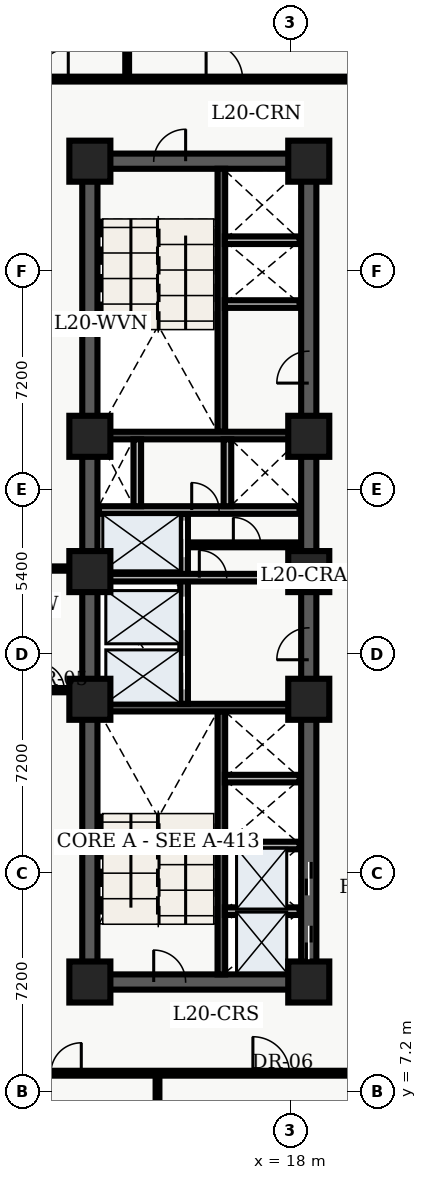
"""IFC4 building model, lengths in metres.
Left out: names, types, materials, properties, quantities, classifications, styles, units other than length and angle.
Written with IfcOpenShell. Run it as: python <this file> out.ifc"""

import sys

from ifc_helpers import new_model, entity, si_unit, converted_unit, direction, frame, origin_with_axes, origin_2d_with_axis, place, context, subcontext, project, spatial, polyline, rectangle, outline, extrude, element, fill, save


model = new_model("IFC4")
c1 = context("Model", 3, precision=1e-05, world=origin_with_axes(), true_north=direction((0.0, 1.0)))
c2 = subcontext(c1, "Body", "Model", "MODEL_VIEW")
j1 = project(units=[si_unit("LENGTHUNIT", "METRE"), converted_unit("PLANEANGLEUNIT", "DEGREE", entity("IfcPlaneAngleMeasure", 0.017), si_unit("PLANEANGLEUNIT", "RADIAN"), dimensions=[0, 0, 0, 0, 0, 0, 0])], contexts=[c1])
p1 = place(None, origin_with_axes())
s1 = spatial("IfcSite", under=j1, at=p1, CompositionType="ELEMENT")
p2 = place(p1, origin_with_axes())
s2 = spatial("IfcBuilding", under=s1, at=p2, CompositionType="ELEMENT")
p3 = place(p2, frame((0.0, 0.0, 84.6), z_axis=(0.0, 0.0, 1.0), x_axis=(1.0, 0.0, 0.0)))
s3 = spatial("IfcBuildingStorey", under=s2, at=p3, CompositionType="ELEMENT", Elevation=84.6)
p4 = place(p3, frame((11.4, 10.8, 0.0), z_axis=(0.0, 0.0, 1.0), x_axis=(0.0, 1.0, 0.0)))
e1 = element("IfcWall", 1, at=p4, inside=s3, PredefinedType="SHEAR", context=c2, shape_type="SweptSolid", body=[
    extrude(outline(polyline([(0.0, -0.25), (27.0, -0.25), (27.0, 0.25), (0.0, 0.25), (0.0, -0.25)])), origin_with_axes(), (0.0, 0.0, 1.0), 4.26),
])
p5 = place(p3, frame((11.4, 10.8, 0.0), z_axis=(0.0, 0.0, 1.0), x_axis=(1.0, 0.0, 0.0)))
e2 = element("IfcWall", 2, at=p5, inside=s3, PredefinedType="SHEAR", context=c2, shape_type="SweptSolid", body=[
    extrude(outline(polyline([(0.0, -0.25), (7.2, -0.25), (7.2, 0.25), (0.0, 0.25), (0.0, -0.25)])), origin_with_axes(), (0.0, 0.0, 1.0), 4.26),
])
p6 = place(p5, frame((2.625, 0.0, 0.0), z_axis=(0.0, 0.0, 1.0), x_axis=(1.0, 0.0, 0.0)))
e3 = element("IfcOpeningElement", 3, at=p6, cuts=e2, PredefinedType="OPENING", context=c2, shape_type="SweptSolid", body=[
    extrude(rectangle(XDim=1.05, YDim=0.52, at=origin_2d_with_axis()), origin_with_axes(), (0.0, 0.0, 1.0), 2.15),
])
p7 = place(p3, frame((11.4, 37.8, 0.0), z_axis=(0.0, 0.0, 1.0), x_axis=(1.0, 0.0, 0.0)))
e4 = element("IfcWall", 4, at=p7, inside=s3, PredefinedType="SHEAR", context=c2, shape_type="SweptSolid", body=[
    extrude(outline(polyline([(0.0, -0.25), (7.2, -0.25), (7.2, 0.25), (0.0, 0.25), (0.0, -0.25)])), origin_with_axes(), (0.0, 0.0, 1.0), 4.26),
])
p8 = place(p7, frame((2.625, 0.0, 0.0), z_axis=(0.0, 0.0, 1.0), x_axis=(1.0, 0.0, 0.0)))
e5 = element("IfcOpeningElement", 5, at=p8, cuts=e4, PredefinedType="OPENING", context=c2, shape_type="SweptSolid", body=[
    extrude(rectangle(XDim=1.05, YDim=0.52, at=origin_2d_with_axis()), origin_with_axes(), (0.0, 0.0, 1.0), 2.15),
])
p9 = place(p3, frame((18.6, 10.8, 0.0), z_axis=(0.0, 0.0, 1.0), x_axis=(0.0, 1.0, 0.0)))
e6 = element("IfcWall", 6, at=p9, inside=s3, PredefinedType="SHEAR", context=c2, shape_type="SweptSolid", body=[
    extrude(outline(polyline([(0.0, -0.25), (13.5, -0.25), (13.5, 0.25), (0.0, 0.25), (0.0, -0.25)])), origin_with_axes(), (0.0, 0.0, 1.0), 4.26),
])
p10 = place(p9, frame((1.3, 0.0, 0.0), z_axis=(0.0, 0.0, 1.0), x_axis=(1.0, 0.0, 0.0)))
e7 = element("IfcOpeningElement", 7, at=p10, cuts=e6, PredefinedType="OPENING", context=c2, shape_type="SweptSolid", body=[
    extrude(rectangle(XDim=1.1, YDim=0.52, at=origin_2d_with_axis()), origin_with_axes(), (0.0, 0.0, 1.0), 2.15),
])
p11 = place(p9, frame((3.4, 0.0, 0.0), z_axis=(0.0, 0.0, 1.0), x_axis=(1.0, 0.0, 0.0)))
e8 = element("IfcOpeningElement", 8, at=p11, cuts=e6, PredefinedType="OPENING", context=c2, shape_type="SweptSolid", body=[
    extrude(rectangle(XDim=1.1, YDim=0.52, at=origin_2d_with_axis()), origin_with_axes(), (0.0, 0.0, 1.0), 2.15),
])
p12 = place(p9, frame((11.125, 0.0, 0.0), z_axis=(0.0, 0.0, 1.0), x_axis=(1.0, 0.0, 0.0)))
e9 = element("IfcOpeningElement", 9, at=p12, cuts=e6, PredefinedType="OPENING", context=c2, shape_type="SweptSolid", body=[
    extrude(rectangle(XDim=1.05, YDim=0.52, at=origin_2d_with_axis()), origin_with_axes(), (0.0, 0.0, 1.0), 2.15),
])
p13 = place(p3, frame((18.6, 24.3, 0.0), z_axis=(0.0, 0.0, 1.0), x_axis=(0.0, 1.0, 0.0)))
e10 = element("IfcWall", 10, at=p13, inside=s3, PredefinedType="SHEAR", context=c2, shape_type="SweptSolid", body=[
    extrude(outline(polyline([(0.0, -0.25), (13.5, -0.25), (13.5, 0.25), (0.0, 0.25), (0.0, -0.25)])), origin_with_axes(), (0.0, 0.0, 1.0), 4.26),
])
p14 = place(p13, frame((6.725, 0.0, 0.0), z_axis=(0.0, 0.0, 1.0), x_axis=(1.0, 0.0, 0.0)))
e11 = element("IfcOpeningElement", 11, at=p14, cuts=e10, PredefinedType="OPENING", context=c2, shape_type="SweptSolid", body=[
    extrude(rectangle(XDim=1.05, YDim=0.52, at=origin_2d_with_axis()), origin_with_axes(), (0.0, 0.0, 1.0), 2.15),
])
p15 = place(p3, frame((15.725, 11.05, 0.0), z_axis=(0.0, 0.0, 1.0), x_axis=(0.0, 1.0, 0.0)))
e12 = element("IfcWall", 12, at=p15, inside=s3, PredefinedType="SHEAR", context=c2, shape_type="SweptSolid", body=[
    extrude(outline(polyline([(0.0, -0.125), (8.65, -0.125), (8.65, 0.125), (0.0, 0.125), (0.0, -0.125)])), origin_with_axes(), (0.0, 0.0, 1.0), 4.26),
])
p16 = place(p3, frame((11.65, 19.825, 0.0), z_axis=(0.0, 0.0, 1.0), x_axis=(1.0, 0.0, 0.0)))
e13 = element("IfcWall", 13, at=p16, inside=s3, PredefinedType="SHEAR", context=c2, shape_type="SweptSolid", body=[
    extrude(outline(polyline([(0.0, -0.125), (6.7, -0.125), (6.7, 0.125), (0.0, 0.125), (0.0, -0.125)])), origin_with_axes(), (0.0, 0.0, 1.0), 4.26),
])
p17 = place(p3, frame((15.725, 28.9, 0.0), z_axis=(0.0, 0.0, 1.0), x_axis=(0.0, 1.0, 0.0)))
e14 = element("IfcWall", 14, at=p17, inside=s3, PredefinedType="SHEAR", context=c2, shape_type="SweptSolid", body=[
    extrude(outline(polyline([(0.0, -0.125), (8.65, -0.125), (8.65, 0.125), (0.0, 0.125), (0.0, -0.125)])), origin_with_axes(), (0.0, 0.0, 1.0), 4.26),
])
p18 = place(p3, frame((11.65, 28.775, 0.0), z_axis=(0.0, 0.0, 1.0), x_axis=(1.0, 0.0, 0.0)))
e15 = element("IfcWall", 15, at=p18, inside=s3, PredefinedType="SHEAR", context=c2, shape_type="SweptSolid", body=[
    extrude(outline(polyline([(0.0, -0.125), (6.7, -0.125), (6.7, 0.125), (0.0, 0.125), (0.0, -0.125)])), origin_with_axes(), (0.0, 0.0, 1.0), 4.26),
])
p19 = place(p3, frame((14.5, 19.95, 0.0), z_axis=(0.0, 0.0, 1.0), x_axis=(0.0, 1.0, 0.0)))
e16 = element("IfcWall", 16, at=p19, inside=s3, PredefinedType="SOLIDWALL", context=c2, shape_type="SweptSolid", body=[
    extrude(outline(polyline([(0.0, -0.125), (6.25, -0.125), (6.25, 0.125), (0.0, 0.125), (0.0, -0.125)])), origin_with_axes(), (0.0, 0.0, 1.0), 3.3),
])
p20 = place(p19, frame((1.025, 0.0, 0.0), z_axis=(0.0, 0.0, 1.0), x_axis=(1.0, 0.0, 0.0)))
e17 = element("IfcOpeningElement", 17, at=p20, cuts=e16, PredefinedType="OPENING", context=c2, shape_type="SweptSolid", body=[
    extrude(rectangle(XDim=1.1, YDim=0.27, at=origin_2d_with_axis()), origin_with_axes(), (0.0, 0.0, 1.0), 2.15),
])
p21 = place(p19, frame((2.975, 0.0, 0.0), z_axis=(0.0, 0.0, 1.0), x_axis=(1.0, 0.0, 0.0)))
e18 = element("IfcOpeningElement", 18, at=p21, cuts=e16, PredefinedType="OPENING", context=c2, shape_type="SweptSolid", body=[
    extrude(rectangle(XDim=1.1, YDim=0.27, at=origin_2d_with_axis()), origin_with_axes(), (0.0, 0.0, 1.0), 2.15),
])
p22 = place(p19, frame((5.425, 0.0, 0.0), z_axis=(0.0, 0.0, 1.0), x_axis=(1.0, 0.0, 0.0)))
e19 = element("IfcOpeningElement", 19, at=p22, cuts=e16, PredefinedType="OPENING", context=c2, shape_type="SweptSolid", body=[
    extrude(rectangle(XDim=1.2, YDim=0.27, at=origin_2d_with_axis()), origin_with_axes(), (0.0, 0.0, 1.0), 2.15),
])
p23 = place(p3, frame((11.7, 24.1, 0.0), z_axis=(0.0, 0.0, 1.0), x_axis=(1.0, 0.0, 0.0)))
e20 = element("IfcWall", 20, at=p23, inside=s3, PredefinedType="SOLIDWALL", context=c2, shape_type="SweptSolid", body=[
    extrude(outline(polyline([(0.0, -0.125), (6.6, -0.125), (6.6, 0.125), (0.0, 0.125), (0.0, -0.125)])), origin_with_axes(), (0.0, 0.0, 1.0), 3.3),
])
p24 = place(p23, frame((3.75, 0.0, 0.0), z_axis=(0.0, 0.0, 1.0), x_axis=(1.0, 0.0, 0.0)))
e21 = element("IfcOpeningElement", 21, at=p24, cuts=e20, PredefinedType="OPENING", context=c2, shape_type="SweptSolid", body=[
    extrude(rectangle(XDim=0.9, YDim=0.27, at=origin_2d_with_axis()), origin_with_axes(), (0.0, 0.0, 1.0), 2.15),
])
p25 = place(p3, frame((11.7, 26.325, 0.0), z_axis=(0.0, 0.0, 1.0), x_axis=(1.0, 0.0, 0.0)))
e22 = element("IfcWall", 22, at=p25, inside=s3, PredefinedType="SOLIDWALL", context=c2, shape_type="SweptSolid", body=[
    extrude(outline(polyline([(0.0, -0.125), (6.6, -0.125), (6.6, 0.125), (0.0, 0.125), (0.0, -0.125)])), origin_with_axes(), (0.0, 0.0, 1.0), 3.3),
])
p26 = place(p25, frame((3.5, 0.0, 0.0), z_axis=(0.0, 0.0, 1.0), x_axis=(1.0, 0.0, 0.0)))
e23 = element("IfcOpeningElement", 23, at=p26, cuts=e22, PredefinedType="OPENING", context=c2, shape_type="SweptSolid", body=[
    extrude(rectangle(XDim=0.9, YDim=0.27, at=origin_2d_with_axis()), origin_with_axes(), (0.0, 0.0, 1.0), 2.15),
])
for number, where, z_axis, x_axis in (
    (24, (12.96, 26.45, 0.0), (0.0, 0.0, 1.0), (0.0, 1.0, 0.0)),
    (25, (15.925, 26.45, 0.0), (0.0, 0.0, 1.0), (0.0, 1.0, 0.0)),
):
    element("IfcWall", number, at=place(p3, frame(where, z_axis=z_axis, x_axis=x_axis)), inside=s3, PredefinedType="SOLIDWALL", context=c2, shape_type="SweptSolid", body=[
        extrude(outline(polyline([(0.0, -0.125), (2.2, -0.125), (2.2, 0.125), (0.0, 0.125), (0.0, -0.125)])), origin_with_axes(), (0.0, 0.0, 1.0), 3.3),
    ])
for number, where, z_axis, x_axis in (
    (26, (11.4, 10.8, 0.0), (0.0, 0.0, 1.0), (1.0, 0.0, 0.0)),
    (27, (11.4, 20.1, 0.0), (0.0, 0.0, 1.0), (1.0, 0.0, 0.0)),
    (28, (11.4, 24.3, 0.0), (0.0, 0.0, 1.0), (1.0, 0.0, 0.0)),
    (29, (11.4, 28.75, 0.0), (0.0, 0.0, 1.0), (1.0, 0.0, 0.0)),
    (30, (11.4, 37.8, 0.0), (0.0, 0.0, 1.0), (1.0, 0.0, 0.0)),
    (31, (18.6, 10.8, 0.0), (0.0, 0.0, 1.0), (1.0, 0.0, 0.0)),
    (32, (18.6, 20.1, 0.0), (0.0, 0.0, 1.0), (1.0, 0.0, 0.0)),
    (33, (18.6, 24.3, 0.0), (0.0, 0.0, 1.0), (1.0, 0.0, 0.0)),
    (34, (18.6, 28.75, 0.0), (0.0, 0.0, 1.0), (1.0, 0.0, 0.0)),
    (35, (18.6, 37.8, 0.0), (0.0, 0.0, 1.0), (1.0, 0.0, 0.0)),
):
    element("IfcColumn", number, at=place(p3, frame(where, z_axis=z_axis, x_axis=x_axis)), inside=s3, PredefinedType="COLUMN", context=c2, shape_type="SweptSolid", body=[
        extrude(rectangle(XDim=1.35, YDim=1.35, at=origin_2d_with_axis()), origin_with_axes(), (0.0, 0.0, 1.0), 4.5),
    ])
p27 = place(p3, frame((14.62, 25.18, 0.0), z_axis=(0.0, 0.0, 1.0), x_axis=(1.0, 0.0, 0.0)))
e36 = element("IfcWall", 36, at=p27, inside=s3, PredefinedType="PARTITIONING", context=c2, shape_type="SweptSolid", body=[
    extrude(outline(polyline([(0.0, -0.08), (3.68, -0.08), (3.68, 0.08), (0.0, 0.08), (0.0, -0.08)])), origin_with_axes(), (0.0, 0.0, 1.0), 3.2),
])
p28 = place(p27, frame((1.95, 0.0, 0.0), z_axis=(0.0, 0.0, 1.0), x_axis=(1.0, 0.0, 0.0)))
e37 = element("IfcOpeningElement", 37, at=p28, cuts=e36, PredefinedType="OPENING", context=c2, shape_type="SweptSolid", body=[
    extrude(rectangle(XDim=0.9, YDim=0.18, at=origin_2d_with_axis()), origin_with_axes(), (0.0, 0.0, 1.0), 2.15),
])
for number, where, z_axis, x_axis in (
    (38, (15.84, 13.13, 0.0), (0.0, 0.0, 1.0), (1.0, 0.0, 0.0)),
    (39, (15.84, 15.29, 0.0), (0.0, 0.0, 1.0), (1.0, 0.0, 0.0)),
    (40, (15.84, 17.49, 0.0), (0.0, 0.0, 1.0), (1.0, 0.0, 0.0)),
    (41, (15.84, 33.1, 0.0), (0.0, 0.0, 1.0), (1.0, 0.0, 0.0)),
    (42, (15.84, 35.2, 0.0), (0.0, 0.0, 1.0), (1.0, 0.0, 0.0)),
):
    element("IfcWall", number, at=place(p3, frame(where, z_axis=z_axis, x_axis=x_axis)), inside=s3, PredefinedType="SOLIDWALL", context=c2, shape_type="SweptSolid", body=[
        extrude(outline(polyline([(0.0, -0.125), (2.46, -0.125), (2.46, 0.125), (0.0, 0.125), (0.0, -0.125)])), origin_with_axes(), (0.0, 0.0, 1.0), 3.2),
    ])
p29 = place(p3, frame((9.52, 20.4, 0.0), z_axis=(0.0, 0.0, 1.0), x_axis=(1.0, 0.0, 0.0)))
e43 = element("IfcWall", 43, at=p29, inside=s3, PredefinedType="PARTITIONING", context=c2, shape_type="SweptSolid", body=[
    extrude(outline(polyline([(0.0, -0.07), (1.58, -0.07), (1.58, 0.07), (0.0, 0.07), (0.0, -0.07)])), origin_with_axes(), (0.0, 0.0, 1.0), 3.2),
])
p30 = place(p29, frame((0.59, 0.0, 0.0), z_axis=(0.0, 0.0, 1.0), x_axis=(1.0, 0.0, 0.0)))
e44 = element("IfcOpeningElement", 44, at=p30, cuts=e43, PredefinedType="OPENING", context=c2, shape_type="SweptSolid", body=[
    extrude(rectangle(XDim=0.9, YDim=0.16, at=origin_2d_with_axis()), origin_with_axes(), (0.0, 0.0, 1.0), 2.15),
])
p31 = place(p3, frame((9.52, 24.4, 0.0), z_axis=(0.0, 0.0, 1.0), x_axis=(1.0, 0.0, 0.0)))
e45 = element("IfcWall", 45, at=p31, inside=s3, PredefinedType="PARTITIONING", context=c2, shape_type="SweptSolid", body=[
    extrude(outline(polyline([(0.0, -0.07), (1.58, -0.07), (1.58, 0.07), (0.0, 0.07), (0.0, -0.07)])), origin_with_axes(), (0.0, 0.0, 1.0), 3.2),
])
p32 = place(p3, frame((2.6, 7.8, 0.0), z_axis=(0.0, 0.0, 1.0), x_axis=(1.0, 0.0, 0.0)))
e46 = element("IfcWall", 46, at=p32, inside=s3, PredefinedType="PARTITIONING", context=c2, shape_type="SweptSolid", body=[
    extrude(outline(polyline([(0.0, -0.08), (18.55, -0.08), (18.55, 0.08), (0.0, 0.08), (0.0, -0.08)])), origin_with_axes(), (0.0, 0.0, 1.0), 3.2),
])
p33 = place(p32, frame((2.501, 0.0, 0.0), z_axis=(0.0, 0.0, 1.0), x_axis=(1.0, 0.0, 0.0)))
e47 = element("IfcOpeningElement", 47, at=p33, cuts=e46, PredefinedType="OPENING", context=c2, shape_type="SweptSolid", body=[
    extrude(rectangle(XDim=1.0, YDim=0.18, at=origin_2d_with_axis()), origin_with_axes(), (0.0, 0.0, 1.0), 2.15),
])
p34 = place(p32, frame((8.018, 0.0, 0.0), z_axis=(0.0, 0.0, 1.0), x_axis=(1.0, 0.0, 0.0)))
e48 = element("IfcOpeningElement", 48, at=p34, cuts=e46, PredefinedType="OPENING", context=c2, shape_type="SweptSolid", body=[
    extrude(rectangle(XDim=1.0, YDim=0.18, at=origin_2d_with_axis()), origin_with_axes(), (0.0, 0.0, 1.0), 2.15),
])
p35 = place(p32, frame((14.762, 0.0, 0.0), z_axis=(0.0, 0.0, 1.0), x_axis=(1.0, 0.0, 0.0)))
e49 = element("IfcOpeningElement", 49, at=p35, cuts=e46, PredefinedType="OPENING", context=c2, shape_type="SweptSolid", body=[
    extrude(rectangle(XDim=1.2, YDim=0.18, at=origin_2d_with_axis()), origin_with_axes(), (0.0, 0.0, 1.0), 2.2),
])
p36 = place(p3, frame((2.6, 40.5, 0.0), z_axis=(0.0, 0.0, 1.0), x_axis=(1.0, 0.0, 0.0)))
e50 = element("IfcWall", 50, at=p36, inside=s3, PredefinedType="PARTITIONING", context=c2, shape_type="SweptSolid", body=[
    extrude(outline(polyline([(0.0, -0.08), (18.65, -0.08), (18.65, 0.08), (0.0, 0.08), (0.0, -0.08)])), origin_with_axes(), (0.0, 0.0, 1.0), 3.2),
])
p37 = place(p36, frame((2.291, 0.0, 0.0), z_axis=(0.0, 0.0, 1.0), x_axis=(1.0, 0.0, 0.0)))
e51 = element("IfcOpeningElement", 51, at=p37, cuts=e50, PredefinedType="OPENING", context=c2, shape_type="SweptSolid", body=[
    extrude(rectangle(XDim=1.0, YDim=0.18, at=origin_2d_with_axis()), origin_with_axes(), (0.0, 0.0, 1.0), 2.15),
])
p38 = place(p36, frame((7.59, 0.0, 0.0), z_axis=(0.0, 0.0, 1.0), x_axis=(1.0, 0.0, 0.0)))
e52 = element("IfcOpeningElement", 52, at=p38, cuts=e50, PredefinedType="OPENING", context=c2, shape_type="SweptSolid", body=[
    extrude(rectangle(XDim=1.0, YDim=0.18, at=origin_2d_with_axis()), origin_with_axes(), (0.0, 0.0, 1.0), 2.15),
])
p39 = place(p36, frame((13.223, 0.0, 0.0), z_axis=(0.0, 0.0, 1.0), x_axis=(1.0, 0.0, 0.0)))
e53 = element("IfcOpeningElement", 53, at=p39, cuts=e50, PredefinedType="OPENING", context=c2, shape_type="SweptSolid", body=[
    extrude(rectangle(XDim=1.2, YDim=0.18, at=origin_2d_with_axis()), origin_with_axes(), (0.0, 0.0, 1.0), 2.2),
])
p40 = place(p3, frame((13.625, 0.36, 0.0), z_axis=(0.0, 0.0, 1.0), x_axis=(0.0, 1.0, 0.0)))
e54 = element("IfcWall", 54, at=p40, inside=s3, PredefinedType="PARTITIONING", context=c2, shape_type="SweptSolid", body=[
    extrude(outline(polyline([(0.0, -0.062), (7.34, -0.062), (7.34, 0.062), (0.0, 0.062), (0.0, -0.062)])), origin_with_axes(), (0.0, 0.0, 1.0), 3.2),
])
p41 = place(p3, frame((12.627, 40.6, 0.0), z_axis=(0.0, 0.0, 1.0), x_axis=(0.0, 1.0, 0.0)))
e55 = element("IfcWall", 55, at=p41, inside=s3, PredefinedType="PARTITIONING", context=c2, shape_type="SweptSolid", body=[
    extrude(outline(polyline([(0.0, -0.062), (7.64, -0.062), (7.64, 0.062), (0.0, 0.062), (0.0, -0.062)])), origin_with_axes(), (0.0, 0.0, 1.0), 3.2),
])
p42 = place(p9, frame((1.3, 0.0, 0.0), z_axis=(0.0, 0.0, 1.0), x_axis=(1.0, 0.0, 0.0)))
e56 = element("IfcDoor", 56, at=p42, inside=s3, OperationType="SLIDING_TO_LEFT", PredefinedType="DOOR", context=c2, shape_type="SweptSolid", body=[
    extrude(rectangle(XDim=1.1, YDim=0.09, at=origin_2d_with_axis()), origin_with_axes(), (0.0, 0.0, 1.0), 2.15),
])
fill(e7, e56)
p43 = place(p9, frame((3.4, 0.0, 0.0), z_axis=(0.0, 0.0, 1.0), x_axis=(1.0, 0.0, 0.0)))
e57 = element("IfcDoor", 57, at=p43, inside=s3, OperationType="SLIDING_TO_RIGHT", PredefinedType="DOOR", context=c2, shape_type="SweptSolid", body=[
    extrude(rectangle(XDim=1.1, YDim=0.09, at=origin_2d_with_axis()), origin_with_axes(), (0.0, 0.0, 1.0), 2.15),
])
fill(e8, e57)
p44 = place(p19, frame((1.025, 0.0, 0.0), z_axis=(0.0, 0.0, 1.0), x_axis=(1.0, 0.0, 0.0)))
e58 = element("IfcDoor", 58, at=p44, inside=s3, OperationType="SLIDING_TO_LEFT", PredefinedType="DOOR", context=c2, shape_type="SweptSolid", body=[
    extrude(rectangle(XDim=1.1, YDim=0.09, at=origin_2d_with_axis()), origin_with_axes(), (0.0, 0.0, 1.0), 2.15),
])
fill(e17, e58)
p45 = place(p19, frame((2.975, 0.0, 0.0), z_axis=(0.0, 0.0, 1.0), x_axis=(1.0, 0.0, 0.0)))
e59 = element("IfcDoor", 59, at=p45, inside=s3, OperationType="SLIDING_TO_RIGHT", PredefinedType="DOOR", context=c2, shape_type="SweptSolid", body=[
    extrude(rectangle(XDim=1.1, YDim=0.09, at=origin_2d_with_axis()), origin_with_axes(), (0.0, 0.0, 1.0), 2.15),
])
fill(e18, e59)
p46 = place(p19, frame((5.425, 0.0, 0.0), z_axis=(0.0, 0.0, 1.0), x_axis=(1.0, 0.0, 0.0)))
e60 = element("IfcDoor", 60, at=p46, inside=s3, OperationType="DOUBLE_DOOR_SLIDING", PredefinedType="DOOR", context=c2, shape_type="SweptSolid", body=[
    extrude(rectangle(XDim=1.2, YDim=0.09, at=origin_2d_with_axis()), origin_with_axes(), (0.0, 0.0, 1.0), 2.15),
])
fill(e19, e60)
p47 = place(p5, frame((2.625, 0.0, 0.0), z_axis=(0.0, 0.0, 1.0), x_axis=(1.0, 0.0, 0.0)))
e61 = element("IfcDoor", 61, at=p47, inside=s3, OperationType="SINGLE_SWING_LEFT", PredefinedType="DOOR", context=c2, shape_type="SweptSolid", body=[
    extrude(rectangle(XDim=1.05, YDim=0.09, at=origin_2d_with_axis()), origin_with_axes(), (0.0, 0.0, 1.0), 2.15),
])
fill(e3, e61)
p48 = place(p7, frame((2.625, 0.0, 0.0), z_axis=(0.0, 0.0, 1.0), x_axis=(1.0, 0.0, 0.0)))
e62 = element("IfcDoor", 62, at=p48, inside=s3, OperationType="SINGLE_SWING_RIGHT", PredefinedType="DOOR", context=c2, shape_type="SweptSolid", body=[
    extrude(rectangle(XDim=1.05, YDim=0.09, at=origin_2d_with_axis()), origin_with_axes(), (0.0, 0.0, 1.0), 2.15),
])
fill(e5, e62)
p49 = place(p9, frame((11.125, 0.0, 0.0), z_axis=(0.0, 0.0, 1.0), x_axis=(1.0, 0.0, 0.0)))
e63 = element("IfcDoor", 63, at=p49, inside=s3, OperationType="SINGLE_SWING_LEFT", PredefinedType="DOOR", context=c2, shape_type="SweptSolid", body=[
    extrude(rectangle(XDim=1.05, YDim=0.09, at=origin_2d_with_axis()), origin_with_axes(), (0.0, 0.0, 1.0), 2.15),
])
fill(e9, e63)
p50 = place(p25, frame((3.5, 0.0, 0.0), z_axis=(0.0, 0.0, 1.0), x_axis=(1.0, 0.0, 0.0)))
e64 = element("IfcDoor", 64, at=p50, inside=s3, OperationType="SINGLE_SWING_LEFT", PredefinedType="DOOR", context=c2, shape_type="SweptSolid", body=[
    extrude(rectangle(XDim=0.9, YDim=0.09, at=origin_2d_with_axis()), origin_with_axes(), (0.0, 0.0, 1.0), 2.15),
])
fill(e23, e64)
p51 = place(p23, frame((3.75, 0.0, 0.0), z_axis=(0.0, 0.0, 1.0), x_axis=(1.0, 0.0, 0.0)))
e65 = element("IfcDoor", 65, at=p51, inside=s3, OperationType="SINGLE_SWING_LEFT", PredefinedType="DOOR", context=c2, shape_type="SweptSolid", body=[
    extrude(rectangle(XDim=0.9, YDim=0.09, at=origin_2d_with_axis()), origin_with_axes(), (0.0, 0.0, 1.0), 2.15),
])
fill(e21, e65)
p52 = place(p27, frame((1.95, 0.0, 0.0), z_axis=(0.0, 0.0, 1.0), x_axis=(1.0, 0.0, 0.0)))
e66 = element("IfcDoor", 66, at=p52, inside=s3, OperationType="SINGLE_SWING_LEFT", PredefinedType="DOOR", context=c2, shape_type="SweptSolid", body=[
    extrude(rectangle(XDim=0.9, YDim=0.09, at=origin_2d_with_axis()), origin_with_axes(), (0.0, 0.0, 1.0), 2.15),
])
fill(e37, e66)
p53 = place(p13, frame((6.725, 0.0, 0.0), z_axis=(0.0, 0.0, 1.0), x_axis=(1.0, 0.0, 0.0)))
e67 = element("IfcDoor", 67, at=p53, inside=s3, OperationType="SINGLE_SWING_LEFT", PredefinedType="DOOR", context=c2, shape_type="SweptSolid", body=[
    extrude(rectangle(XDim=1.05, YDim=0.09, at=origin_2d_with_axis()), origin_with_axes(), (0.0, 0.0, 1.0), 2.15),
])
fill(e11, e67)
p54 = place(p29, frame((0.59, 0.0, 0.0), z_axis=(0.0, 0.0, 1.0), x_axis=(1.0, 0.0, 0.0)))
e68 = element("IfcDoor", 68, at=p54, inside=s3, OperationType="SINGLE_SWING_LEFT", PredefinedType="DOOR", context=c2, shape_type="SweptSolid", body=[
    extrude(rectangle(XDim=0.9, YDim=0.084, at=origin_2d_with_axis()), origin_with_axes(), (0.0, 0.0, 1.0), 2.15),
])
fill(e44, e68)
p55 = place(p32, frame((8.018, 0.0, 0.0), z_axis=(0.0, 0.0, 1.0), x_axis=(1.0, 0.0, 0.0)))
e69 = element("IfcDoor", 69, at=p55, inside=s3, OperationType="SINGLE_SWING_RIGHT", PredefinedType="DOOR", context=c2, shape_type="SweptSolid", body=[
    extrude(rectangle(XDim=1.0, YDim=0.09, at=origin_2d_with_axis()), origin_with_axes(), (0.0, 0.0, 1.0), 2.15),
])
fill(e48, e69)
p56 = place(p32, frame((14.762, 0.0, 0.0), z_axis=(0.0, 0.0, 1.0), x_axis=(1.0, 0.0, 0.0)))
e70 = element("IfcDoor", 70, at=p56, inside=s3, OperationType="SINGLE_SWING_LEFT", PredefinedType="DOOR", context=c2, shape_type="SweptSolid", body=[
    extrude(rectangle(XDim=1.2, YDim=0.09, at=origin_2d_with_axis()), origin_with_axes(), (0.0, 0.0, 1.0), 2.2),
])
fill(e49, e70)
p57 = place(p36, frame((7.59, 0.0, 0.0), z_axis=(0.0, 0.0, 1.0), x_axis=(1.0, 0.0, 0.0)))
e71 = element("IfcDoor", 71, at=p57, inside=s3, OperationType="SINGLE_SWING_RIGHT", PredefinedType="DOOR", context=c2, shape_type="SweptSolid", body=[
    extrude(rectangle(XDim=1.0, YDim=0.09, at=origin_2d_with_axis()), origin_with_axes(), (0.0, 0.0, 1.0), 2.15),
])
fill(e52, e71)
p58 = place(p36, frame((13.223, 0.0, 0.0), z_axis=(0.0, 0.0, 1.0), x_axis=(1.0, 0.0, 0.0)))
e72 = element("IfcDoor", 72, at=p58, inside=s3, OperationType="SINGLE_SWING_LEFT", PredefinedType="DOOR", context=c2, shape_type="SweptSolid", body=[
    extrude(rectangle(XDim=1.2, YDim=0.09, at=origin_2d_with_axis()), origin_with_axes(), (0.0, 0.0, 1.0), 2.2),
])
fill(e53, e72)
save(model, sys.argv[1])
